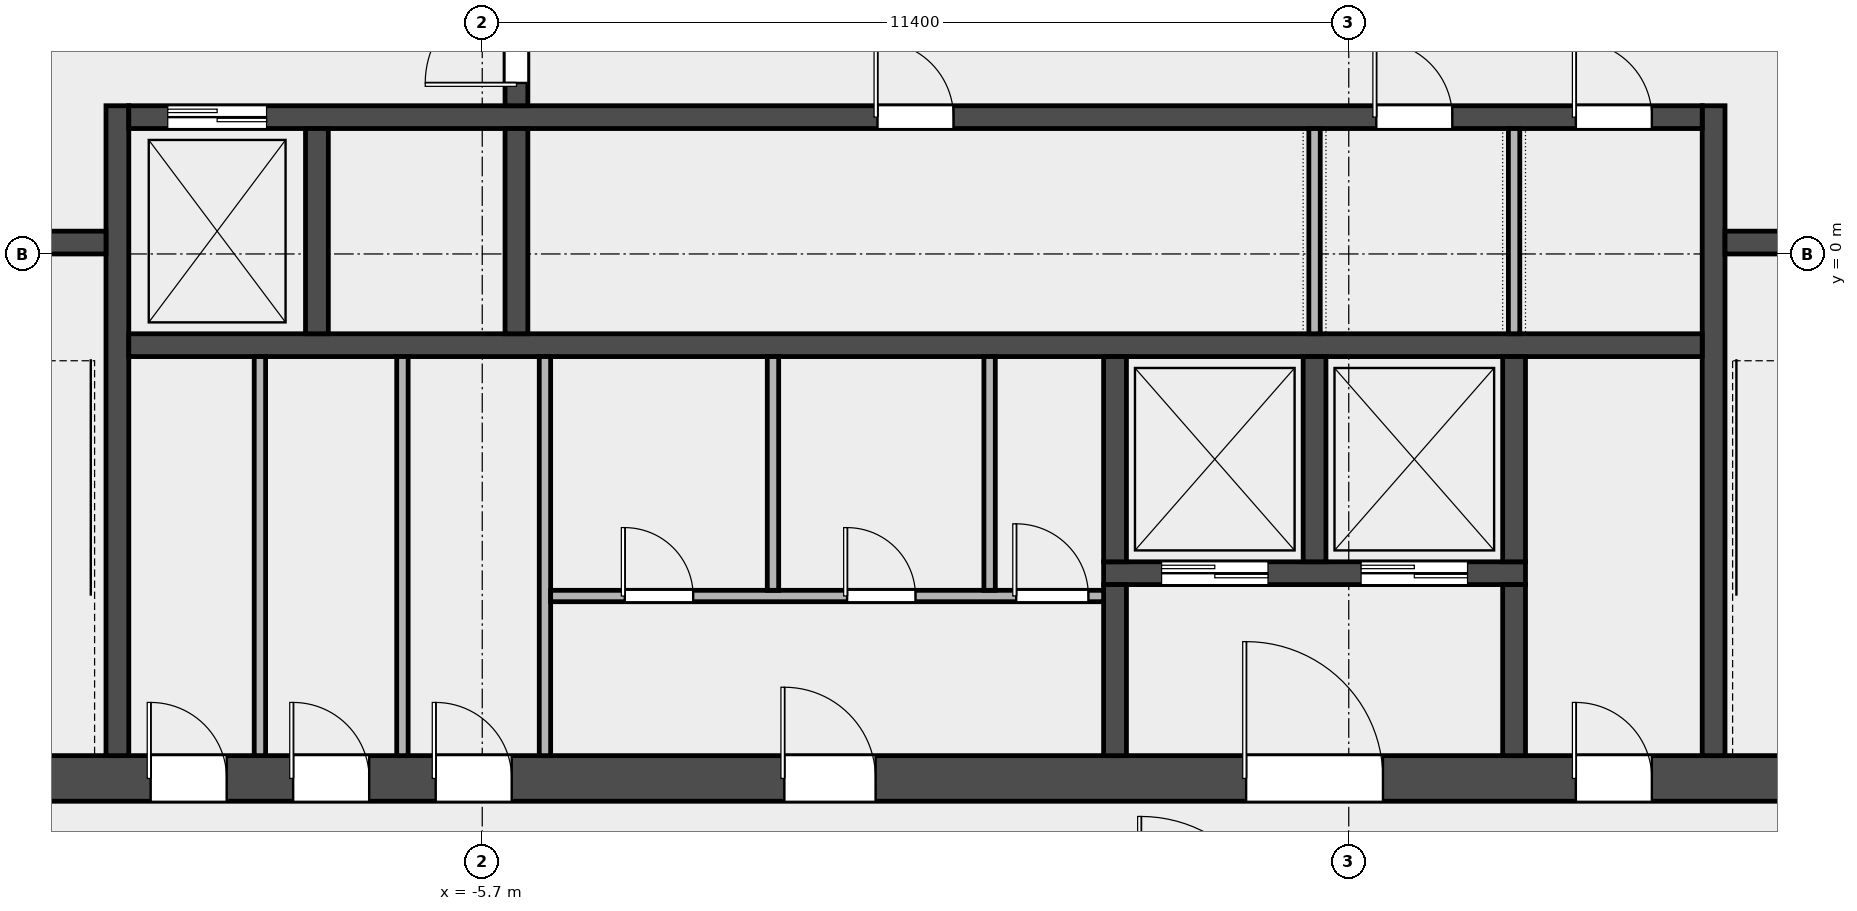
"""IFC4 building model, lengths in metres.
Left out: names, types, materials, properties, quantities, classifications, styles, units other than length and angle.
Written with IfcOpenShell. Run it as: python <this file> out.ifc"""

import sys

from ifc_helpers import new_model, si_unit, direction, frame, frame_2d, origin, place, context, subcontext, project, spatial, rectangle, extrude, element, fill, save


model = new_model("IFC4")
c1 = context("Model", 3, precision=1e-05, world=origin(), true_north=direction((0.0, 1.0)))
c2 = subcontext(c1, "Body", "Model", "MODEL_VIEW")
j1 = project(units=[si_unit("LENGTHUNIT", "METRE"), si_unit("PLANEANGLEUNIT", "RADIAN")], contexts=[c1])
p1 = place(None, origin())
s1 = spatial("IfcSite", under=j1, at=p1, CompositionType="ELEMENT")
p2 = place(p1, origin())
s2 = spatial("IfcBuilding", under=s1, at=p2, CompositionType="ELEMENT")
p3 = place(p2, frame((0.0, 0.0, 231.0)))
s3 = spatial("IfcBuildingStorey", under=s2, at=p3, CompositionType="ELEMENT", Elevation=231.0)
p4 = place(p3, frame((-14.4, -6.9, 0.0), z_axis=(0.0, 0.0, 1.0), x_axis=(1.0, 0.0, 0.0)))
e1 = element("IfcWall", 1, at=p4, inside=s3, PredefinedType="SHEAR", context=c2, shape_type="SweptSolid", body=[
    extrude(rectangle(XDim=28.8, YDim=0.6, at=frame_2d((14.4, 0.0))), origin(), (0.0, 0.0, 1.0), 3.7),
])
p5 = place(p4, frame((4.337, 0.0, 0.0)))
e2 = element("IfcOpeningElement", 2, at=p5, cuts=e1, PredefinedType="OPENING", context=c2, shape_type="SweptSolid", body=[
    extrude(rectangle(XDim=1.0, YDim=2.1, at=frame_2d((0.5, 1.05))), frame((0.0, 0.312, 0.0), z_axis=(0.0, -1.0, 0.0), x_axis=(1.0, 0.0, 0.0)), (0.0, 0.0, 1.0), 0.624),
])
p6 = place(p4, frame((6.212, 0.0, 0.0)))
e3 = element("IfcOpeningElement", 3, at=p6, cuts=e1, PredefinedType="OPENING", context=c2, shape_type="SweptSolid", body=[
    extrude(rectangle(XDim=1.0, YDim=2.1, at=frame_2d((0.5, 1.05))), frame((0.0, 0.312, 0.0), z_axis=(0.0, -1.0, 0.0), x_axis=(1.0, 0.0, 0.0)), (0.0, 0.0, 1.0), 0.624),
])
p7 = place(p4, frame((8.087, 0.0, 0.0)))
e4 = element("IfcOpeningElement", 4, at=p7, cuts=e1, PredefinedType="OPENING", context=c2, shape_type="SweptSolid", body=[
    extrude(rectangle(XDim=1.0, YDim=2.1, at=frame_2d((0.5, 1.05))), frame((0.0, 0.312, 0.0), z_axis=(0.0, -1.0, 0.0), x_axis=(1.0, 0.0, 0.0)), (0.0, 0.0, 1.0), 0.624),
])
p8 = place(p4, frame((12.675, 0.0, 0.0)))
e5 = element("IfcOpeningElement", 5, at=p8, cuts=e1, PredefinedType="OPENING", context=c2, shape_type="SweptSolid", body=[
    extrude(rectangle(XDim=1.2, YDim=2.1, at=frame_2d((0.6, 1.05))), frame((0.0, 0.312, 0.0), z_axis=(0.0, -1.0, 0.0), x_axis=(1.0, 0.0, 0.0)), (0.0, 0.0, 1.0), 0.624),
])
p9 = place(p4, frame((18.75, 0.0, 0.0)))
e6 = element("IfcOpeningElement", 6, at=p9, cuts=e1, PredefinedType="OPENING", context=c2, shape_type="SweptSolid", body=[
    extrude(rectangle(XDim=1.8, YDim=2.1, at=frame_2d((0.9, 1.05))), frame((0.0, 0.312, 0.0), z_axis=(0.0, -1.0, 0.0), x_axis=(1.0, 0.0, 0.0)), (0.0, 0.0, 1.0), 0.624),
])
p10 = place(p4, frame((23.087, 0.0, 0.0)))
e7 = element("IfcOpeningElement", 7, at=p10, cuts=e1, PredefinedType="OPENING", context=c2, shape_type="SweptSolid", body=[
    extrude(rectangle(XDim=1.0, YDim=2.1, at=frame_2d((0.5, 1.05))), frame((0.0, 0.312, 0.0), z_axis=(0.0, -1.0, 0.0), x_axis=(1.0, 0.0, 0.0)), (0.0, 0.0, 1.0), 0.624),
])
for number, where, z_axis, x_axis in (
    (8, (-10.5, -6.6, 0.0), (0.0, 0.0, 1.0), (0.0, 1.0, 0.0)),
    (9, (10.5, -6.6, 0.0), (0.0, 0.0, 1.0), (0.0, 1.0, 0.0)),
):
    element("IfcWall", number, at=place(p3, frame(where, z_axis=z_axis, x_axis=x_axis)), inside=s3, PredefinedType="SHEAR", context=c2, shape_type="SweptSolid", body=[
        extrude(rectangle(XDim=8.55, YDim=0.3, at=frame_2d((4.275, 0.0))), origin(), (0.0, 0.0, 1.0), 3.7),
    ])
p11 = place(p3, frame((-13.8, 0.15, 0.0), z_axis=(0.0, 0.0, 1.0), x_axis=(1.0, 0.0, 0.0)))
e10 = element("IfcWall", 10, at=p11, inside=s3, PredefinedType="SOLIDWALL", context=c2, shape_type="SweptSolid", body=[
    extrude(rectangle(XDim=3.15, YDim=0.3, at=frame_2d((1.575, 0.0))), origin(), (0.0, 0.0, 1.0), 3.7),
])
p12 = place(p11, frame((0.975, 0.0, 0.0)))
e11 = element("IfcOpeningElement", 11, at=p12, cuts=e10, PredefinedType="OPENING", context=c2, shape_type="SweptSolid", body=[
    extrude(rectangle(XDim=1.1, YDim=2.1, at=frame_2d((0.55, 1.05))), frame((0.0, 0.162, 0.0), z_axis=(0.0, -1.0, 0.0), x_axis=(1.0, 0.0, 0.0)), (0.0, 0.0, 1.0), 0.324),
])
p13 = place(p3, frame((10.65, 0.15, 0.0), z_axis=(0.0, 0.0, 1.0), x_axis=(1.0, 0.0, 0.0)))
e12 = element("IfcWall", 12, at=p13, inside=s3, PredefinedType="SOLIDWALL", context=c2, shape_type="SweptSolid", body=[
    extrude(rectangle(XDim=3.15, YDim=0.3, at=frame_2d((1.575, 0.0))), origin(), (0.0, 0.0, 1.0), 3.7),
])
p14 = place(p13, frame((1.025, 0.0, 0.0)))
e13 = element("IfcOpeningElement", 13, at=p14, cuts=e12, PredefinedType="OPENING", context=c2, shape_type="SweptSolid", body=[
    extrude(rectangle(XDim=1.1, YDim=2.1, at=frame_2d((0.55, 1.05))), frame((0.0, 0.162, 0.0), z_axis=(0.0, -1.0, 0.0), x_axis=(1.0, 0.0, 0.0)), (0.0, 0.0, 1.0), 0.324),
])
p15 = place(p3, frame((-10.35, -1.2, 0.0), z_axis=(0.0, 0.0, 1.0), x_axis=(1.0, 0.0, 0.0)))
e14 = element("IfcWall", 14, at=p15, inside=s3, PredefinedType="SOLIDWALL", context=c2, shape_type="SweptSolid", body=[
    extrude(rectangle(XDim=20.7, YDim=0.3, at=frame_2d((10.35, 0.0))), origin(), (0.0, 0.0, 1.0), 3.7),
])
p16 = place(p3, frame((-10.35, 1.8, 0.0), z_axis=(0.0, 0.0, 1.0), x_axis=(1.0, 0.0, 0.0)))
e15 = element("IfcWall", 15, at=p16, inside=s3, PredefinedType="SOLIDWALL", context=c2, shape_type="SweptSolid", body=[
    extrude(rectangle(XDim=20.7, YDim=0.3, at=frame_2d((10.35, 0.0))), origin(), (0.0, 0.0, 1.0), 3.7),
])
p17 = place(p16, frame((0.512, 0.0, 0.0)))
e16 = element("IfcOpeningElement", 16, at=p17, cuts=e15, PredefinedType="OPENING", context=c2, shape_type="SweptSolid", body=[
    extrude(rectangle(XDim=1.3, YDim=2.1, at=frame_2d((0.65, 1.05))), frame((0.0, 0.162, 0.0), z_axis=(0.0, -1.0, 0.0), x_axis=(1.0, 0.0, 0.0)), (0.0, 0.0, 1.0), 0.324),
])
p18 = place(p16, frame((9.85, 0.0, 0.0)))
e17 = element("IfcOpeningElement", 17, at=p18, cuts=e15, PredefinedType="OPENING", context=c2, shape_type="SweptSolid", body=[
    extrude(rectangle(XDim=1.0, YDim=2.1, at=frame_2d((0.5, 1.05))), frame((0.0, 0.162, 0.0), z_axis=(0.0, -1.0, 0.0), x_axis=(1.0, 0.0, 0.0)), (0.0, 0.0, 1.0), 0.324),
])
p19 = place(p16, frame((16.413, 0.0, 0.0)))
e18 = element("IfcOpeningElement", 18, at=p19, cuts=e15, PredefinedType="OPENING", context=c2, shape_type="SweptSolid", body=[
    extrude(rectangle(XDim=1.0, YDim=2.1, at=frame_2d((0.5, 1.05))), frame((0.0, 0.162, 0.0), z_axis=(0.0, -1.0, 0.0), x_axis=(1.0, 0.0, 0.0)), (0.0, 0.0, 1.0), 0.324),
])
p20 = place(p16, frame((19.038, 0.0, 0.0)))
e19 = element("IfcOpeningElement", 19, at=p20, cuts=e15, PredefinedType="OPENING", context=c2, shape_type="SweptSolid", body=[
    extrude(rectangle(XDim=1.0, YDim=2.1, at=frame_2d((0.5, 1.05))), frame((0.0, 0.162, 0.0), z_axis=(0.0, -1.0, 0.0), x_axis=(1.0, 0.0, 0.0)), (0.0, 0.0, 1.0), 0.324),
])
for number, where, z_axis, x_axis in (
    (20, (-7.875, -1.05, 0.0), (0.0, 0.0, 1.0), (0.0, 1.0, 0.0)),
    (21, (-5.25, -1.05, 0.0), (0.0, 0.0, 1.0), (0.0, 1.0, 0.0)),
):
    element("IfcWall", number, at=place(p3, frame(where, z_axis=z_axis, x_axis=x_axis)), inside=s3, PredefinedType="SOLIDWALL", context=c2, shape_type="SweptSolid", body=[
        extrude(rectangle(XDim=2.7, YDim=0.3, at=frame_2d((1.35, 0.0))), origin(), (0.0, 0.0, 1.0), 3.7),
    ])
p21 = place(p3, frame((-5.25, 1.95, 0.0), z_axis=(0.0, 0.0, 1.0), x_axis=(0.0, 1.0, 0.0)))
e22 = element("IfcWall", 22, at=p21, inside=s3, PredefinedType="SOLIDWALL", context=c2, shape_type="SweptSolid", body=[
    extrude(rectangle(XDim=3.3, YDim=0.3, at=frame_2d((1.65, 0.0))), origin(), (0.0, 0.0, 1.0), 3.7),
])
p22 = place(p21, frame((0.3, 0.0, 0.0)))
e23 = element("IfcOpeningElement", 23, at=p22, cuts=e22, PredefinedType="OPENING", context=c2, shape_type="SweptSolid", body=[
    extrude(rectangle(XDim=1.2, YDim=2.1, at=frame_2d((0.6, 1.05))), frame((0.0, 0.162, 0.0), z_axis=(0.0, -1.0, 0.0), x_axis=(1.0, 0.0, 0.0)), (0.0, 0.0, 1.0), 0.324),
])
p23 = place(p21, frame((1.8, 0.0, 0.0)))
e24 = element("IfcOpeningElement", 24, at=p23, cuts=e22, PredefinedType="OPENING", context=c2, shape_type="SweptSolid", body=[
    extrude(rectangle(XDim=1.2, YDim=2.1, at=frame_2d((0.6, 1.05))), frame((0.0, 0.162, 0.0), z_axis=(0.0, -1.0, 0.0), x_axis=(1.0, 0.0, 0.0)), (0.0, 0.0, 1.0), 0.324),
])
p24 = place(p3, frame((2.475, -4.2, 0.0), z_axis=(0.0, 0.0, 1.0), x_axis=(1.0, 0.0, 0.0)))
e25 = element("IfcWall", 25, at=p24, inside=s3, PredefinedType="SOLIDWALL", context=c2, shape_type="SweptSolid", body=[
    extrude(rectangle(XDim=5.55, YDim=0.3, at=frame_2d((2.775, 0.0))), origin(), (0.0, 0.0, 1.0), 3.7),
])
p25 = place(p24, frame((0.762, 0.0, 0.0)))
e26 = element("IfcOpeningElement", 26, at=p25, cuts=e25, PredefinedType="OPENING", context=c2, shape_type="SweptSolid", body=[
    extrude(rectangle(XDim=1.4, YDim=2.1, at=frame_2d((0.7, 1.05))), frame((0.0, 0.162, 0.0), z_axis=(0.0, -1.0, 0.0), x_axis=(1.0, 0.0, 0.0)), (0.0, 0.0, 1.0), 0.324),
])
p26 = place(p24, frame((3.387, 0.0, 0.0)))
e27 = element("IfcOpeningElement", 27, at=p26, cuts=e25, PredefinedType="OPENING", context=c2, shape_type="SweptSolid", body=[
    extrude(rectangle(XDim=1.4, YDim=2.1, at=frame_2d((0.7, 1.05))), frame((0.0, 0.162, 0.0), z_axis=(0.0, -1.0, 0.0), x_axis=(1.0, 0.0, 0.0)), (0.0, 0.0, 1.0), 0.324),
])
p27 = place(p3, frame((2.625, -4.05, 0.0), z_axis=(0.0, 0.0, 1.0), x_axis=(0.0, 1.0, 0.0)))
e28 = element("IfcWall", 28, at=p27, inside=s3, PredefinedType="SOLIDWALL", context=c2, shape_type="SweptSolid", body=[
    extrude(rectangle(XDim=2.7, YDim=0.3, at=frame_2d((1.35, 0.0))), origin(), (0.0, 0.0, 1.0), 3.7),
])
p28 = place(p3, frame((2.625, -6.6, 0.0), z_axis=(0.0, 0.0, 1.0), x_axis=(0.0, 1.0, 0.0)))
e29 = element("IfcWall", 29, at=p28, inside=s3, PredefinedType="SOLIDWALL", context=c2, shape_type="SweptSolid", body=[
    extrude(rectangle(XDim=2.25, YDim=0.3, at=frame_2d((1.125, 0.0))), origin(), (0.0, 0.0, 1.0), 3.7),
])
for number, where, z_axis, x_axis in (
    (30, (5.25, -4.05, 0.0), (0.0, 0.0, 1.0), (0.0, 1.0, 0.0)),
    (31, (7.875, -4.05, 0.0), (0.0, 0.0, 1.0), (0.0, 1.0, 0.0)),
):
    element("IfcWall", number, at=place(p3, frame(where, z_axis=z_axis, x_axis=x_axis)), inside=s3, PredefinedType="SOLIDWALL", context=c2, shape_type="SweptSolid", body=[
        extrude(rectangle(XDim=2.7, YDim=0.3, at=frame_2d((1.35, 0.0))), origin(), (0.0, 0.0, 1.0), 3.7),
    ])
p29 = place(p3, frame((7.875, -6.6, 0.0), z_axis=(0.0, 0.0, 1.0), x_axis=(0.0, 1.0, 0.0)))
e32 = element("IfcWall", 32, at=p29, inside=s3, PredefinedType="SOLIDWALL", context=c2, shape_type="SweptSolid", body=[
    extrude(rectangle(XDim=2.25, YDim=0.3, at=frame_2d((1.125, 0.0))), origin(), (0.0, 0.0, 1.0), 3.7),
])
for number, where, z_axis, x_axis in (
    (33, (-8.625, -6.6, 0.0), (0.0, 0.0, 1.0), (0.0, 1.0, 0.0)),
    (34, (-6.75, -6.6, 0.0), (0.0, 0.0, 1.0), (0.0, 1.0, 0.0)),
    (35, (-4.875, -6.6, 0.0), (0.0, 0.0, 1.0), (0.0, 1.0, 0.0)),
):
    element("IfcWall", number, at=place(p3, frame(where, z_axis=z_axis, x_axis=x_axis)), inside=s3, PredefinedType="PARTITIONING", context=c2, shape_type="SweptSolid", body=[
        extrude(rectangle(XDim=5.25, YDim=0.15, at=frame_2d((2.625, 0.0))), origin(), (0.0, 0.0, 1.0), 3.7),
    ])
p30 = place(p3, frame((-4.8, -4.5, 0.0), z_axis=(0.0, 0.0, 1.0), x_axis=(1.0, 0.0, 0.0)))
e36 = element("IfcWall", 36, at=p30, inside=s3, PredefinedType="PARTITIONING", context=c2, shape_type="SweptSolid", body=[
    extrude(rectangle(XDim=7.275, YDim=0.15, at=frame_2d((3.638, 0.0))), origin(), (0.0, 0.0, 1.0), 3.7),
])
p31 = place(p30, frame((0.975, 0.0, 0.0)))
e37 = element("IfcOpeningElement", 37, at=p31, cuts=e36, PredefinedType="OPENING", context=c2, shape_type="SweptSolid", body=[
    extrude(rectangle(XDim=0.9, YDim=2.1, at=frame_2d((0.45, 1.05))), frame((0.0, 0.087, 0.0), z_axis=(0.0, -1.0, 0.0), x_axis=(1.0, 0.0, 0.0)), (0.0, 0.0, 1.0), 0.174),
])
p32 = place(p30, frame((3.9, 0.0, 0.0)))
e38 = element("IfcOpeningElement", 38, at=p32, cuts=e36, PredefinedType="OPENING", context=c2, shape_type="SweptSolid", body=[
    extrude(rectangle(XDim=0.9, YDim=2.1, at=frame_2d((0.45, 1.05))), frame((0.0, 0.087, 0.0), z_axis=(0.0, -1.0, 0.0), x_axis=(1.0, 0.0, 0.0)), (0.0, 0.0, 1.0), 0.174),
])
p33 = place(p30, frame((6.125, 0.0, 0.0)))
e39 = element("IfcOpeningElement", 39, at=p33, cuts=e36, PredefinedType="OPENING", context=c2, shape_type="SweptSolid", body=[
    extrude(rectangle(XDim=0.95, YDim=2.1, at=frame_2d((0.475, 1.05))), frame((0.0, 0.087, 0.0), z_axis=(0.0, -1.0, 0.0), x_axis=(1.0, 0.0, 0.0)), (0.0, 0.0, 1.0), 0.174),
])
for number, where, z_axis, x_axis in (
    (40, (-1.875, -4.425, 0.0), (0.0, 0.0, 1.0), (0.0, 1.0, 0.0)),
    (41, (0.975, -4.425, 0.0), (0.0, 0.0, 1.0), (0.0, 1.0, 0.0)),
):
    element("IfcWall", number, at=place(p3, frame(where, z_axis=z_axis, x_axis=x_axis)), inside=s3, PredefinedType="PARTITIONING", context=c2, shape_type="SweptSolid", body=[
        extrude(rectangle(XDim=3.075, YDim=0.15, at=frame_2d((1.538, 0.0))), origin(), (0.0, 0.0, 1.0), 3.7),
    ])
for number, where, z_axis, x_axis in (
    (42, (5.25, -1.05, 0.0), (0.0, 0.0, 1.0), (0.0, 1.0, 0.0)),
    (43, (7.875, -1.05, 0.0), (0.0, 0.0, 1.0), (0.0, 1.0, 0.0)),
):
    element("IfcWall", number, at=place(p3, frame(where, z_axis=z_axis, x_axis=x_axis)), inside=s3, PredefinedType="PARTITIONING", context=c2, shape_type="SweptSolid", body=[
        extrude(rectangle(XDim=2.7, YDim=0.15, at=frame_2d((1.35, 0.0))), origin(), (0.0, 0.0, 1.0), 3.7),
    ])
p34 = place(p22, origin())
e44 = element("IfcDoor", 44, at=p34, inside=s3, OperationType="SINGLE_SWING_LEFT", PredefinedType="DOOR", context=c2, shape_type="SweptSolid", body=[
    extrude(rectangle(XDim=1.2, YDim=2.1, at=frame_2d((0.6, 1.05))), frame((0.0, 0.025, 0.0), z_axis=(0.0, -1.0, 0.0), x_axis=(1.0, 0.0, 0.0)), (0.0, 0.0, 1.0), 0.05),
])
fill(e23, e44)
p35 = place(p17, origin())
e45 = element("IfcDoor", 45, at=p35, inside=s3, OperationType="DOUBLE_DOOR_SLIDING", PredefinedType="DOOR", context=c2, shape_type="SweptSolid", body=[
    extrude(rectangle(XDim=1.3, YDim=2.1, at=frame_2d((0.65, 1.05))), frame((0.0, 0.025, 0.0), z_axis=(0.0, -1.0, 0.0), x_axis=(1.0, 0.0, 0.0)), (0.0, 0.0, 1.0), 0.05),
])
fill(e16, e45)
p36 = place(p25, origin())
e46 = element("IfcDoor", 46, at=p36, inside=s3, OperationType="DOUBLE_DOOR_SLIDING", PredefinedType="DOOR", context=c2, shape_type="SweptSolid", body=[
    extrude(rectangle(XDim=1.4, YDim=2.1, at=frame_2d((0.7, 1.05))), frame((0.0, 0.025, 0.0), z_axis=(0.0, -1.0, 0.0), x_axis=(1.0, 0.0, 0.0)), (0.0, 0.0, 1.0), 0.05),
])
fill(e26, e46)
p37 = place(p26, origin())
e47 = element("IfcDoor", 47, at=p37, inside=s3, OperationType="DOUBLE_DOOR_SLIDING", PredefinedType="DOOR", context=c2, shape_type="SweptSolid", body=[
    extrude(rectangle(XDim=1.4, YDim=2.1, at=frame_2d((0.7, 1.05))), frame((0.0, 0.025, 0.0), z_axis=(0.0, -1.0, 0.0), x_axis=(1.0, 0.0, 0.0)), (0.0, 0.0, 1.0), 0.05),
])
fill(e27, e47)
p38 = place(p5, origin())
e48 = element("IfcDoor", 48, at=p38, inside=s3, OperationType="SINGLE_SWING_LEFT", PredefinedType="DOOR", context=c2, shape_type="SweptSolid", body=[
    extrude(rectangle(XDim=1.0, YDim=2.1, at=frame_2d((0.5, 1.05))), frame((0.0, 0.025, 0.0), z_axis=(0.0, -1.0, 0.0), x_axis=(1.0, 0.0, 0.0)), (0.0, 0.0, 1.0), 0.05),
])
fill(e2, e48)
p39 = place(p6, origin())
e49 = element("IfcDoor", 49, at=p39, inside=s3, OperationType="SINGLE_SWING_LEFT", PredefinedType="DOOR", context=c2, shape_type="SweptSolid", body=[
    extrude(rectangle(XDim=1.0, YDim=2.1, at=frame_2d((0.5, 1.05))), frame((0.0, 0.025, 0.0), z_axis=(0.0, -1.0, 0.0), x_axis=(1.0, 0.0, 0.0)), (0.0, 0.0, 1.0), 0.05),
])
fill(e3, e49)
p40 = place(p7, origin())
e50 = element("IfcDoor", 50, at=p40, inside=s3, OperationType="SINGLE_SWING_LEFT", PredefinedType="DOOR", context=c2, shape_type="SweptSolid", body=[
    extrude(rectangle(XDim=1.0, YDim=2.1, at=frame_2d((0.5, 1.05))), frame((0.0, 0.025, 0.0), z_axis=(0.0, -1.0, 0.0), x_axis=(1.0, 0.0, 0.0)), (0.0, 0.0, 1.0), 0.05),
])
fill(e4, e50)
p41 = place(p8, origin())
e51 = element("IfcDoor", 51, at=p41, inside=s3, OperationType="SINGLE_SWING_LEFT", PredefinedType="DOOR", context=c2, shape_type="SweptSolid", body=[
    extrude(rectangle(XDim=1.2, YDim=2.1, at=frame_2d((0.6, 1.05))), frame((0.0, 0.025, 0.0), z_axis=(0.0, -1.0, 0.0), x_axis=(1.0, 0.0, 0.0)), (0.0, 0.0, 1.0), 0.05),
])
fill(e5, e51)
p42 = place(p31, origin())
e52 = element("IfcDoor", 52, at=p42, inside=s3, OperationType="SINGLE_SWING_LEFT", PredefinedType="DOOR", context=c2, shape_type="SweptSolid", body=[
    extrude(rectangle(XDim=0.9, YDim=2.1, at=frame_2d((0.45, 1.05))), frame((0.0, 0.025, 0.0), z_axis=(0.0, -1.0, 0.0), x_axis=(1.0, 0.0, 0.0)), (0.0, 0.0, 1.0), 0.05),
])
fill(e37, e52)
p43 = place(p32, origin())
e53 = element("IfcDoor", 53, at=p43, inside=s3, OperationType="SINGLE_SWING_LEFT", PredefinedType="DOOR", context=c2, shape_type="SweptSolid", body=[
    extrude(rectangle(XDim=0.9, YDim=2.1, at=frame_2d((0.45, 1.05))), frame((0.0, 0.025, 0.0), z_axis=(0.0, -1.0, 0.0), x_axis=(1.0, 0.0, 0.0)), (0.0, 0.0, 1.0), 0.05),
])
fill(e38, e53)
p44 = place(p33, origin())
e54 = element("IfcDoor", 54, at=p44, inside=s3, OperationType="SINGLE_SWING_LEFT", PredefinedType="DOOR", context=c2, shape_type="SweptSolid", body=[
    extrude(rectangle(XDim=0.95, YDim=2.1, at=frame_2d((0.475, 1.05))), frame((0.0, 0.025, 0.0), z_axis=(0.0, -1.0, 0.0), x_axis=(1.0, 0.0, 0.0)), (0.0, 0.0, 1.0), 0.05),
])
fill(e39, e54)
p45 = place(p9, origin())
e55 = element("IfcDoor", 55, at=p45, inside=s3, OperationType="DOUBLE_DOOR_SINGLE_SWING", PredefinedType="DOOR", context=c2, shape_type="SweptSolid", body=[
    extrude(rectangle(XDim=1.8, YDim=2.1, at=frame_2d((0.9, 1.05))), frame((0.0, 0.025, 0.0), z_axis=(0.0, -1.0, 0.0), x_axis=(1.0, 0.0, 0.0)), (0.0, 0.0, 1.0), 0.05),
])
fill(e6, e55)
p46 = place(p10, origin())
e56 = element("IfcDoor", 56, at=p46, inside=s3, OperationType="SINGLE_SWING_LEFT", PredefinedType="DOOR", context=c2, shape_type="SweptSolid", body=[
    extrude(rectangle(XDim=1.0, YDim=2.1, at=frame_2d((0.5, 1.05))), frame((0.0, 0.025, 0.0), z_axis=(0.0, -1.0, 0.0), x_axis=(1.0, 0.0, 0.0)), (0.0, 0.0, 1.0), 0.05),
])
fill(e7, e56)
p47 = place(p18, origin())
e57 = element("IfcDoor", 57, at=p47, inside=s3, OperationType="SINGLE_SWING_LEFT", PredefinedType="DOOR", context=c2, shape_type="SweptSolid", body=[
    extrude(rectangle(XDim=1.0, YDim=2.1, at=frame_2d((0.5, 1.05))), frame((0.0, 0.025, 0.0), z_axis=(0.0, -1.0, 0.0), x_axis=(1.0, 0.0, 0.0)), (0.0, 0.0, 1.0), 0.05),
])
fill(e17, e57)
p48 = place(p19, origin())
e58 = element("IfcDoor", 58, at=p48, inside=s3, OperationType="SINGLE_SWING_LEFT", PredefinedType="DOOR", context=c2, shape_type="SweptSolid", body=[
    extrude(rectangle(XDim=1.0, YDim=2.1, at=frame_2d((0.5, 1.05))), frame((0.0, 0.025, 0.0), z_axis=(0.0, -1.0, 0.0), x_axis=(1.0, 0.0, 0.0)), (0.0, 0.0, 1.0), 0.05),
])
fill(e18, e58)
p49 = place(p20, origin())
e59 = element("IfcDoor", 59, at=p49, inside=s3, OperationType="SINGLE_SWING_LEFT", PredefinedType="DOOR", context=c2, shape_type="SweptSolid", body=[
    extrude(rectangle(XDim=1.0, YDim=2.1, at=frame_2d((0.5, 1.05))), frame((0.0, 0.025, 0.0), z_axis=(0.0, -1.0, 0.0), x_axis=(1.0, 0.0, 0.0)), (0.0, 0.0, 1.0), 0.05),
])
fill(e19, e59)
save(model, sys.argv[1])
